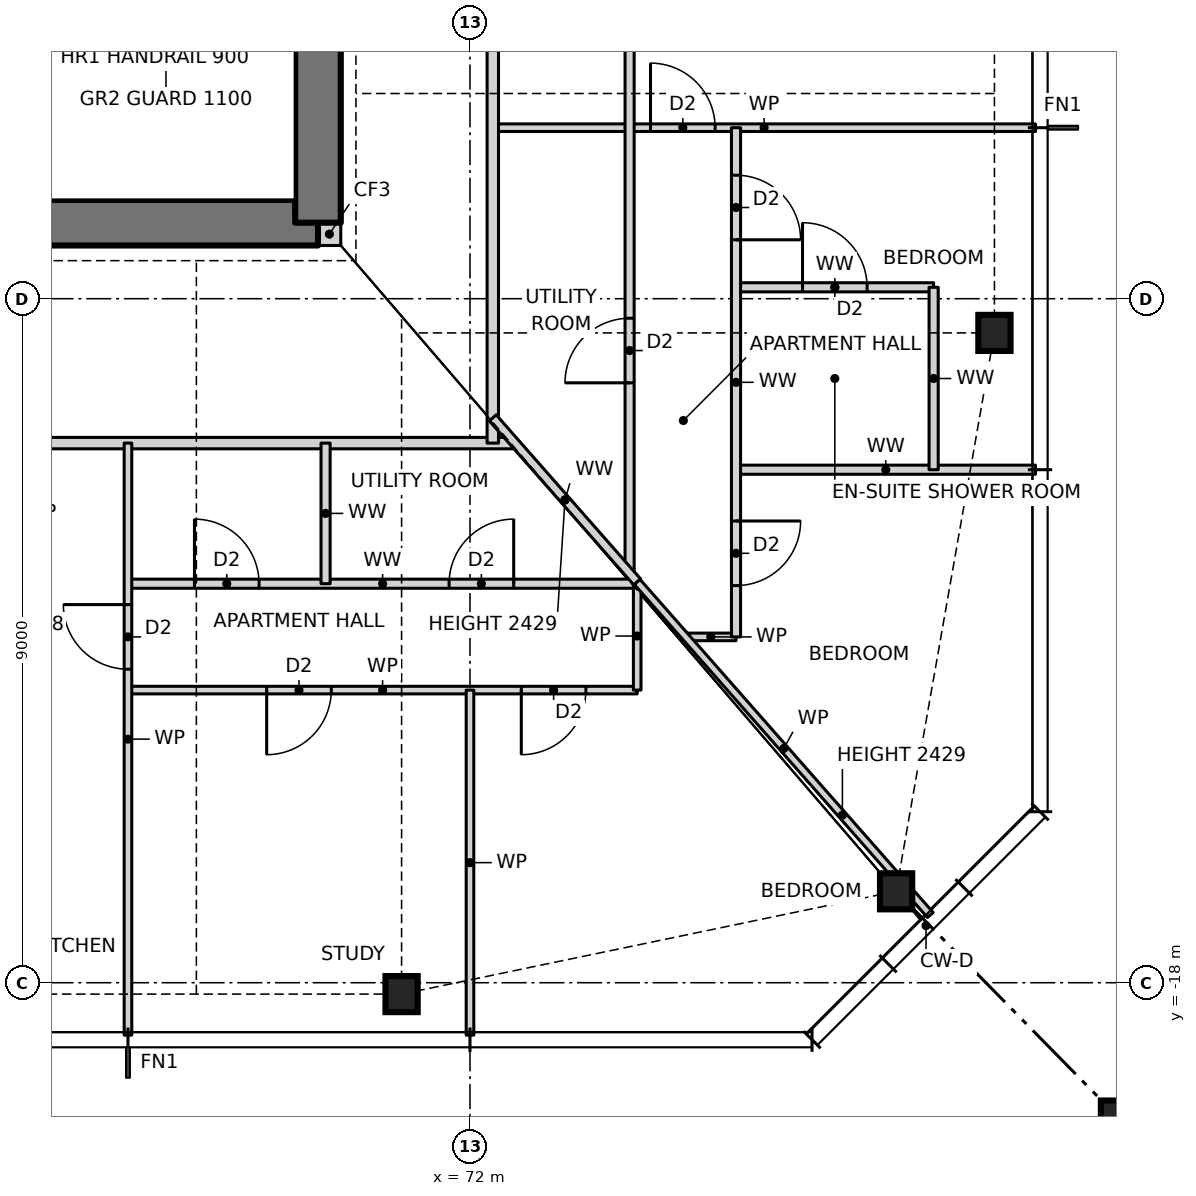
"""IFC4 building model, lengths in metres.
Left out: names, types, materials, properties, quantities, classifications, styles, units other than length and angle.
Written with IfcOpenShell. Run it as: python <this file> out.ifc"""

import sys

from ifc_helpers import new_model, si_unit, direction, frame, frame_2d, origin, origin_2d, place, context, subcontext, project, spatial, rectangle, hollow_rectangle, i_section, extrude, element, fill, save


model = new_model("IFC4")
c1 = context("Model", 3, precision=1e-05, world=origin(), true_north=direction((0.0, 1.0)))
c2 = subcontext(c1, "Body", "Model", "MODEL_VIEW")
j1 = project(units=[si_unit("LENGTHUNIT", "METRE"), si_unit("PLANEANGLEUNIT", "RADIAN")], contexts=[c1])
p1 = place(None, origin())
s1 = spatial("IfcSite", under=j1, at=p1, CompositionType="ELEMENT")
p2 = place(p1, origin())
s2 = spatial("IfcBuilding", under=s1, at=p2, CompositionType="ELEMENT")
p3 = place(p2, frame((0.0, 0.0, 64.0)))
s3 = spatial("IfcBuildingStorey", under=s2, at=p3, CompositionType="ELEMENT", Elevation=64.0)
for number, where, z_axis, x_axis in (
    (1, (71.1, -18.15, 0.0), (0.0, 0.0, 1.0), (1.0, 0.0, 0.0)),
    (2, (77.606, -16.797, 0.0), (0.0, 0.0, 1.0), (1.0, 0.0, 0.0)),
    (3, (78.9, -9.45, 0.0), (0.0, 0.0, 1.0), (1.0, 0.0, 0.0)),
):
    element("IfcColumn", number, at=place(p3, frame(where, z_axis=z_axis, x_axis=x_axis)), inside=s3, PredefinedType="COLUMN", context=c2, shape_type="SweptSolid", body=[
        extrude(i_section(OverallWidth=0.424, OverallDepth=0.475, WebThickness=0.048, FlangeThickness=0.077, at=origin_2d()), origin(), (0.0, 0.0, 1.0), 3.5),
    ])
p4 = place(p3, frame((80.9, -20.15, 0.0), z_axis=(0.0, 0.0, 1.0), x_axis=(1.0, 0.0, 0.0)))
e4 = element("IfcColumn", 4, at=p4, inside=s3, PredefinedType="COLUMN", context=c2, shape_type="SweptSolid", body=[
    extrude(hollow_rectangle(XDim=1.2, YDim=1.2, WallThickness=0.07, at=origin_2d()), origin(), (0.0, 0.0, 1.0), 3.5),
])
p5 = place(p3, frame((70.0, -8.15, 0.0), z_axis=(0.0, 0.0, 1.0), x_axis=(1.0, 0.0, 0.0)))
e5 = element("IfcWall", 5, at=p5, inside=s3, PredefinedType="SOLIDWALL", context=c2, shape_type="SweptSolid", body=[
    extrude(rectangle(XDim=0.3, YDim=0.3, at=frame_2d((0.15, 0.0))), origin(), (0.0, 0.0, 1.0), 3.5),
])
p6 = place(p3, frame((56.0, -8.0, 0.0), z_axis=(0.0, 0.0, 1.0), x_axis=(1.0, 0.0, 0.0)))
e6 = element("IfcWall", 6, at=p6, inside=s3, PredefinedType="SHEAR", context=c2, shape_type="SweptSolid", body=[
    extrude(rectangle(XDim=14.0, YDim=0.6, at=frame_2d((7.0, 0.0))), origin(), (0.0, 0.0, 1.0), 3.5),
])
p7 = place(p6, frame((2.7, 0.0, 0.0)))
e7 = element("IfcOpeningElement", 7, at=p7, cuts=e6, PredefinedType="OPENING", context=c2, shape_type="SweptSolid", body=[
    extrude(rectangle(XDim=0.9, YDim=2.1, at=frame_2d((0.45, 1.05))), frame((0.0, 0.31, 0.0), z_axis=(0.0, -1.0, 0.0), x_axis=(1.0, 0.0, 0.0)), (0.0, 0.0, 1.0), 0.62),
])
p8 = place(p6, frame((7.7, 0.0, 0.0)))
e8 = element("IfcOpeningElement", 8, at=p8, cuts=e6, PredefinedType="OPENING", context=c2, shape_type="SweptSolid", body=[
    extrude(rectangle(XDim=0.9, YDim=2.1, at=frame_2d((0.45, 1.05))), frame((0.0, 0.31, 0.0), z_axis=(0.0, -1.0, 0.0), x_axis=(1.0, 0.0, 0.0)), (0.0, 0.0, 1.0), 0.62),
])
p9 = place(p3, frame((70.0, -8.0, 0.0), z_axis=(0.0, 0.0, 1.0), x_axis=(0.0, 1.0, 0.0)))
e9 = element("IfcWall", 9, at=p9, inside=s3, PredefinedType="SHEAR", context=c2, shape_type="SweptSolid", body=[
    extrude(rectangle(XDim=16.0, YDim=0.6, at=frame_2d((8.0, 0.0))), origin(), (0.0, 0.0, 1.0), 3.5),
])
p10 = place(p9, frame((7.5, 0.0, 0.0)))
e10 = element("IfcOpeningElement", 10, at=p10, cuts=e9, PredefinedType="OPENING", context=c2, shape_type="SweptSolid", body=[
    extrude(rectangle(XDim=1.0, YDim=2.1, at=frame_2d((0.5, 1.05))), frame((0.0, 0.31, 0.0), z_axis=(0.0, -1.0, 0.0), x_axis=(1.0, 0.0, 0.0)), (0.0, 0.0, 1.0), 0.62),
])
p11 = place(p3, frame((67.5, -14.15, 0.0), z_axis=(0.0, 0.0, 1.0), x_axis=(1.0, 0.0, 0.0)))
e11 = element("IfcWall", 11, at=p11, inside=s3, PredefinedType="PARTITIONING", context=c2, shape_type="SweptSolid", body=[
    extrude(rectangle(XDim=6.7, YDim=0.1, at=frame_2d((3.35, 0.0))), origin(), (0.0, 0.0, 1.0), 3.27),
])
p12 = place(p11, frame((1.825, 0.0, 0.0)))
e12 = element("IfcOpeningElement", 12, at=p12, cuts=e11, PredefinedType="OPENING", context=c2, shape_type="SweptSolid", body=[
    extrude(rectangle(XDim=0.85, YDim=2.1, at=frame_2d((0.425, 1.05))), frame((0.0, 0.06, 0.0), z_axis=(0.0, -1.0, 0.0), x_axis=(1.0, 0.0, 0.0)), (0.0, 0.0, 1.0), 0.12),
])
p13 = place(p11, frame((5.175, 0.0, 0.0)))
e13 = element("IfcOpeningElement", 13, at=p13, cuts=e11, PredefinedType="OPENING", context=c2, shape_type="SweptSolid", body=[
    extrude(rectangle(XDim=0.85, YDim=2.1, at=frame_2d((0.425, 1.05))), frame((0.0, 0.06, 0.0), z_axis=(0.0, -1.0, 0.0), x_axis=(1.0, 0.0, 0.0)), (0.0, 0.0, 1.0), 0.12),
])
p14 = place(p3, frame((74.836, -13.45, 0.0), z_axis=(0.0, 0.0, 1.0), x_axis=(1.0, 0.0, 0.0)))
e14 = element("IfcWall", 14, at=p14, inside=s3, PredefinedType="PARTITIONING", context=c2, shape_type="SweptSolid", body=[
    extrude(rectangle(XDim=0.664, YDim=0.1, at=frame_2d((0.332, 0.0))), origin(), (0.0, 0.0, 1.0), 3.27),
])
p15 = place(p3, frame((67.5, -12.75, 0.0), z_axis=(0.0, 0.0, 1.0), x_axis=(1.0, 0.0, 0.0)))
e15 = element("IfcWall", 15, at=p15, inside=s3, PredefinedType="PARTITIONING", context=c2, shape_type="SweptSolid", body=[
    extrude(rectangle(XDim=6.7, YDim=0.12, at=frame_2d((3.35, 0.0))), origin(), (0.0, 0.0, 1.0), 3.27),
])
p16 = place(p15, frame((0.875, 0.0, 0.0)))
e16 = element("IfcOpeningElement", 16, at=p16, cuts=e15, PredefinedType="OPENING", context=c2, shape_type="SweptSolid", body=[
    extrude(rectangle(XDim=0.85, YDim=2.1, at=frame_2d((0.425, 1.05))), frame((0.0, 0.07, 0.0), z_axis=(0.0, -1.0, 0.0), x_axis=(1.0, 0.0, 0.0)), (0.0, 0.0, 1.0), 0.14),
])
p17 = place(p15, frame((4.225, 0.0, 0.0)))
e17 = element("IfcOpeningElement", 17, at=p17, cuts=e15, PredefinedType="OPENING", context=c2, shape_type="SweptSolid", body=[
    extrude(rectangle(XDim=0.85, YDim=2.1, at=frame_2d((0.425, 1.05))), frame((0.0, 0.07, 0.0), z_axis=(0.0, -1.0, 0.0), x_axis=(1.0, 0.0, 0.0)), (0.0, 0.0, 1.0), 0.14),
])
p18 = place(p3, frame((75.5, -11.25, 0.0), z_axis=(0.0, 0.0, 1.0), x_axis=(1.0, 0.0, 0.0)))
e18 = element("IfcWall", 18, at=p18, inside=s3, PredefinedType="PARTITIONING", context=c2, shape_type="SweptSolid", body=[
    extrude(rectangle(XDim=3.94, YDim=0.12, at=frame_2d((1.97, 0.0))), origin(), (0.0, 0.0, 1.0), 3.27),
])
p19 = place(p3, frame((53.408, -10.9, 0.0), z_axis=(0.0, 0.0, 1.0), x_axis=(1.0, 0.0, 0.0)))
e19 = element("IfcWall", 19, at=p19, inside=s3, PredefinedType="PARTITIONING", context=c2, shape_type="SweptSolid", body=[
    extrude(rectangle(XDim=19.184, YDim=0.15, at=frame_2d((9.592, 0.0))), origin(), (0.0, 0.0, 1.0), 3.27),
])
p20 = place(p19, frame((5.092, 0.0, 0.0)))
e20 = element("IfcOpeningElement", 20, at=p20, cuts=e19, PredefinedType="OPENING", context=c2, shape_type="SweptSolid", body=[
    extrude(rectangle(XDim=1.0, YDim=2.1, at=frame_2d((0.5, 1.05))), frame((0.0, 0.085, 0.0), z_axis=(0.0, -1.0, 0.0), x_axis=(1.0, 0.0, 0.0)), (0.0, 0.0, 1.0), 0.17),
])
p21 = place(p19, frame((10.492, 0.0, 0.0)))
e21 = element("IfcOpeningElement", 21, at=p21, cuts=e19, PredefinedType="OPENING", context=c2, shape_type="SweptSolid", body=[
    extrude(rectangle(XDim=1.0, YDim=2.1, at=frame_2d((0.5, 1.05))), frame((0.0, 0.085, 0.0), z_axis=(0.0, -1.0, 0.0), x_axis=(1.0, 0.0, 0.0)), (0.0, 0.0, 1.0), 0.17),
])
p22 = place(p3, frame((75.5, -8.85, 0.0), z_axis=(0.0, 0.0, 1.0), x_axis=(1.0, 0.0, 0.0)))
e22 = element("IfcWall", 22, at=p22, inside=s3, PredefinedType="PARTITIONING", context=c2, shape_type="SweptSolid", body=[
    extrude(rectangle(XDim=2.6, YDim=0.12, at=frame_2d((1.3, 0.0))), origin(), (0.0, 0.0, 1.0), 3.27),
])
p23 = place(p22, frame((0.875, 0.0, 0.0)))
e23 = element("IfcOpeningElement", 23, at=p23, cuts=e22, PredefinedType="OPENING", context=c2, shape_type="SweptSolid", body=[
    extrude(rectangle(XDim=0.85, YDim=2.1, at=frame_2d((0.425, 1.05))), frame((0.0, 0.07, 0.0), z_axis=(0.0, -1.0, 0.0), x_axis=(1.0, 0.0, 0.0)), (0.0, 0.0, 1.0), 0.14),
])
p24 = place(p3, frame((72.3, -6.75, 0.0), z_axis=(0.0, 0.0, 1.0), x_axis=(1.0, 0.0, 0.0)))
e24 = element("IfcWall", 24, at=p24, inside=s3, PredefinedType="PARTITIONING", context=c2, shape_type="SweptSolid", body=[
    extrude(rectangle(XDim=7.14, YDim=0.1, at=frame_2d((3.57, 0.0))), origin(), (0.0, 0.0, 1.0), 3.27),
])
p25 = place(p24, frame((2.075, 0.0, 0.0)))
e25 = element("IfcOpeningElement", 25, at=p25, cuts=e24, PredefinedType="OPENING", context=c2, shape_type="SweptSolid", body=[
    extrude(rectangle(XDim=0.85, YDim=2.1, at=frame_2d((0.425, 1.05))), frame((0.0, 0.06, 0.0), z_axis=(0.0, -1.0, 0.0), x_axis=(1.0, 0.0, 0.0)), (0.0, 0.0, 1.0), 0.12),
])
p26 = place(p3, frame((78.1, -11.25, 0.0), z_axis=(0.0, 0.0, 1.0), x_axis=(0.0, 1.0, 0.0)))
e26 = element("IfcWall", 26, at=p26, inside=s3, PredefinedType="PARTITIONING", context=c2, shape_type="SweptSolid", body=[
    extrude(rectangle(XDim=2.4, YDim=0.12, at=frame_2d((1.2, 0.0))), origin(), (0.0, 0.0, 1.0), 3.27),
])
p27 = place(p3, frame((75.5, -13.45, 0.0), z_axis=(0.0, 0.0, 1.0), x_axis=(0.0, 1.0, 0.0)))
e27 = element("IfcWall", 27, at=p27, inside=s3, PredefinedType="PARTITIONING", context=c2, shape_type="SweptSolid", body=[
    extrude(rectangle(XDim=6.7, YDim=0.12, at=frame_2d((3.35, 0.0))), origin(), (0.0, 0.0, 1.0), 3.27),
])
p28 = place(p27, frame((5.225, 0.0, 0.0)))
e28 = element("IfcOpeningElement", 28, at=p28, cuts=e27, PredefinedType="OPENING", context=c2, shape_type="SweptSolid", body=[
    extrude(rectangle(XDim=0.85, YDim=2.1, at=frame_2d((0.425, 1.05))), frame((0.0, 0.07, 0.0), z_axis=(0.0, -1.0, 0.0), x_axis=(1.0, 0.0, 0.0)), (0.0, 0.0, 1.0), 0.14),
])
p29 = place(p27, frame((0.675, 0.0, 0.0)))
e29 = element("IfcOpeningElement", 29, at=p29, cuts=e27, PredefinedType="OPENING", context=c2, shape_type="SweptSolid", body=[
    extrude(rectangle(XDim=0.85, YDim=2.1, at=frame_2d((0.425, 1.05))), frame((0.0, 0.07, 0.0), z_axis=(0.0, -1.0, 0.0), x_axis=(1.0, 0.0, 0.0)), (0.0, 0.0, 1.0), 0.14),
])
p30 = place(p3, frame((74.2, -14.15, 0.0), z_axis=(0.0, 0.0, 1.0), x_axis=(0.0, 1.0, 0.0)))
e30 = element("IfcWall", 30, at=p30, inside=s3, PredefinedType="PARTITIONING", context=c2, shape_type="SweptSolid", body=[
    extrude(rectangle(XDim=1.423, YDim=0.1, at=frame_2d((0.711, 0.0))), origin(), (0.0, 0.0, 1.0), 3.27),
])
p31 = place(p3, frame((74.1, -12.614, 0.0), z_axis=(0.0, 0.0, 1.0), x_axis=(0.0, 1.0, 0.0)))
e31 = element("IfcWall", 31, at=p31, inside=s3, PredefinedType="PARTITIONING", context=c2, shape_type="SweptSolid", body=[
    extrude(rectangle(XDim=25.228, YDim=0.12, at=frame_2d((12.614, 0.0))), origin(), (0.0, 0.0, 1.0), 3.27),
])
p32 = place(p31, frame((7.239, 0.0, 0.0)))
e32 = element("IfcOpeningElement", 32, at=p32, cuts=e31, PredefinedType="OPENING", context=c2, shape_type="SweptSolid", body=[
    extrude(rectangle(XDim=0.85, YDim=2.1, at=frame_2d((0.425, 1.05))), frame((0.0, 0.07, 0.0), z_axis=(0.0, -1.0, 0.0), x_axis=(1.0, 0.0, 0.0)), (0.0, 0.0, 1.0), 0.14),
])
p33 = place(p31, frame((10.439, 0.0, 0.0)))
e33 = element("IfcOpeningElement", 33, at=p33, cuts=e31, PredefinedType="OPENING", context=c2, shape_type="SweptSolid", body=[
    extrude(rectangle(XDim=0.85, YDim=2.1, at=frame_2d((0.425, 1.05))), frame((0.0, 0.07, 0.0), z_axis=(0.0, -1.0, 0.0), x_axis=(1.0, 0.0, 0.0)), (0.0, 0.0, 1.0), 0.14),
])
p34 = place(p31, frame((2.507, 0.0, 0.0)))
e34 = element("IfcOpeningElement", 34, at=p34, cuts=e31, PredefinedType="OPENING", context=c2, shape_type="SweptSolid", body=[
    extrude(rectangle(XDim=0.85, YDim=2.1, at=frame_2d((0.425, 1.05))), frame((0.0, 0.07, 0.0), z_axis=(0.0, -1.0, 0.0), x_axis=(1.0, 0.0, 0.0)), (0.0, 0.0, 1.0), 0.14),
])
p35 = place(p31, frame((16.639, 0.0, 0.0)))
e35 = element("IfcOpeningElement", 35, at=p35, cuts=e31, PredefinedType="OPENING", context=c2, shape_type="SweptSolid", body=[
    extrude(rectangle(XDim=0.85, YDim=2.1, at=frame_2d((0.425, 1.05))), frame((0.0, 0.07, 0.0), z_axis=(0.0, -1.0, 0.0), x_axis=(1.0, 0.0, 0.0)), (0.0, 0.0, 1.0), 0.14),
])
p36 = place(p31, frame((21.821, 0.0, 0.0)))
e36 = element("IfcOpeningElement", 36, at=p36, cuts=e31, PredefinedType="OPENING", context=c2, shape_type="SweptSolid", body=[
    extrude(rectangle(XDim=0.85, YDim=2.1, at=frame_2d((0.425, 1.05))), frame((0.0, 0.07, 0.0), z_axis=(0.0, -1.0, 0.0), x_axis=(1.0, 0.0, 0.0)), (0.0, 0.0, 1.0), 0.14),
])
p37 = place(p3, frame((72.3, -10.9, 0.0), z_axis=(0.0, 0.0, 1.0), x_axis=(0.0, 1.0, 0.0)))
e37 = element("IfcWall", 37, at=p37, inside=s3, PredefinedType="PARTITIONING", context=c2, shape_type="SweptSolid", body=[
    extrude(rectangle(XDim=21.468, YDim=0.15, at=frame_2d((10.734, 0.0))), origin(), (0.0, 0.0, 1.0), 3.27),
])
p38 = place(p37, frame((8.65, 0.0, 0.0)))
e38 = element("IfcOpeningElement", 38, at=p38, cuts=e37, PredefinedType="OPENING", context=c2, shape_type="SweptSolid", body=[
    extrude(rectangle(XDim=1.0, YDim=2.1, at=frame_2d((0.5, 1.05))), frame((0.0, 0.085, 0.0), z_axis=(0.0, -1.0, 0.0), x_axis=(1.0, 0.0, 0.0)), (0.0, 0.0, 1.0), 0.17),
])
p39 = place(p3, frame((72.0, -18.69, 0.0), z_axis=(0.0, 0.0, 1.0), x_axis=(0.0, 1.0, 0.0)))
e39 = element("IfcWall", 39, at=p39, inside=s3, PredefinedType="PARTITIONING", context=c2, shape_type="SweptSolid", body=[
    extrude(rectangle(XDim=4.54, YDim=0.1, at=frame_2d((2.27, 0.0))), origin(), (0.0, 0.0, 1.0), 3.27),
])
p40 = place(p3, frame((70.1, -12.75, 0.0), z_axis=(0.0, 0.0, 1.0), x_axis=(0.0, 1.0, 0.0)))
e40 = element("IfcWall", 40, at=p40, inside=s3, PredefinedType="PARTITIONING", context=c2, shape_type="SweptSolid", body=[
    extrude(rectangle(XDim=1.85, YDim=0.12, at=frame_2d((0.925, 0.0))), origin(), (0.0, 0.0, 1.0), 3.27),
])
p41 = place(p3, frame((67.5, -18.69, 0.0), z_axis=(0.0, 0.0, 1.0), x_axis=(0.0, 1.0, 0.0)))
e41 = element("IfcWall", 41, at=p41, inside=s3, PredefinedType="PARTITIONING", context=c2, shape_type="SweptSolid", body=[
    extrude(rectangle(XDim=7.79, YDim=0.1, at=frame_2d((3.895, 0.0))), origin(), (0.0, 0.0, 1.0), 3.27),
])
p42 = place(p41, frame((4.815, 0.0, 0.0)))
e42 = element("IfcOpeningElement", 42, at=p42, cuts=e41, PredefinedType="OPENING", context=c2, shape_type="SweptSolid", body=[
    extrude(rectangle(XDim=0.85, YDim=2.1, at=frame_2d((0.425, 1.05))), frame((0.0, 0.06, 0.0), z_axis=(0.0, -1.0, 0.0), x_axis=(1.0, 0.0, 0.0)), (0.0, 0.0, 1.0), 0.12),
])
p43 = place(p3, frame((74.2, -12.727, 0.0), z_axis=(0.0, 0.0, 1.0), x_axis=(-0.66059344937, 0.75074382758, 0.0)))
e43 = element("IfcWall", 43, at=p43, inside=s3, PredefinedType="PARTITIONING", context=c2, shape_type="SweptSolid", body=[
    extrude(rectangle(XDim=2.876, YDim=0.12, at=frame_2d((1.438, 0.0))), origin(), (0.0, 0.0, 1.0), 2.429),
])
p44 = place(p3, frame((78.057, -17.109, 0.0), z_axis=(0.0, 0.0, 1.0), x_axis=(-0.660654290516, 0.750690287951, 0.0)))
e44 = element("IfcWall", 44, at=p44, inside=s3, PredefinedType="PARTITIONING", context=c2, shape_type="SweptSolid", body=[
    extrude(rectangle(XDim=5.838, YDim=0.1, at=frame_2d((2.919, 0.0))), origin(), (0.0, 0.0, 1.0), 2.429),
])
p45 = place(p42, origin())
e45 = element("IfcDoor", 45, at=p45, inside=s3, OperationType="SINGLE_SWING_RIGHT", PredefinedType="DOOR", context=c2, shape_type="SweptSolid", body=[
    extrude(rectangle(XDim=0.85, YDim=2.1, at=frame_2d((0.425, 1.05))), frame((0.0, 0.025, 0.0), z_axis=(0.0, -1.0, 0.0), x_axis=(1.0, 0.0, 0.0)), (0.0, 0.0, 1.0), 0.05),
])
fill(e42, e45)
p46 = place(p12, frame((0.85, 0.0, 0.0), z_axis=(0.0, 0.0, 1.0), x_axis=(-1.0, 0.0, 0.0)))
e46 = element("IfcDoor", 46, at=p46, inside=s3, OperationType="SINGLE_SWING_RIGHT", PredefinedType="DOOR", context=c2, shape_type="SweptSolid", body=[
    extrude(rectangle(XDim=0.85, YDim=2.1, at=frame_2d((0.425, 1.05))), frame((0.0, 0.025, 0.0), z_axis=(0.0, -1.0, 0.0), x_axis=(1.0, 0.0, 0.0)), (0.0, 0.0, 1.0), 0.05),
])
fill(e12, e46)
p47 = place(p13, frame((0.85, 0.0, 0.0), z_axis=(0.0, 0.0, 1.0), x_axis=(-1.0, 0.0, 0.0)))
e47 = element("IfcDoor", 47, at=p47, inside=s3, OperationType="SINGLE_SWING_RIGHT", PredefinedType="DOOR", context=c2, shape_type="SweptSolid", body=[
    extrude(rectangle(XDim=0.85, YDim=2.1, at=frame_2d((0.425, 1.05))), frame((0.0, 0.025, 0.0), z_axis=(0.0, -1.0, 0.0), x_axis=(1.0, 0.0, 0.0)), (0.0, 0.0, 1.0), 0.05),
])
fill(e13, e47)
p48 = place(p16, origin())
e48 = element("IfcDoor", 48, at=p48, inside=s3, OperationType="SINGLE_SWING_LEFT", PredefinedType="DOOR", context=c2, shape_type="SweptSolid", body=[
    extrude(rectangle(XDim=0.85, YDim=2.1, at=frame_2d((0.425, 1.05))), frame((0.0, 0.025, 0.0), z_axis=(0.0, -1.0, 0.0), x_axis=(1.0, 0.0, 0.0)), (0.0, 0.0, 1.0), 0.05),
])
fill(e16, e48)
p49 = place(p17, origin())
e49 = element("IfcDoor", 49, at=p49, inside=s3, OperationType="SINGLE_SWING_RIGHT", PredefinedType="DOOR", context=c2, shape_type="SweptSolid", body=[
    extrude(rectangle(XDim=0.85, YDim=2.1, at=frame_2d((0.425, 1.05))), frame((0.0, 0.025, 0.0), z_axis=(0.0, -1.0, 0.0), x_axis=(1.0, 0.0, 0.0)), (0.0, 0.0, 1.0), 0.05),
])
fill(e17, e49)
p50 = place(p25, origin())
e50 = element("IfcDoor", 50, at=p50, inside=s3, OperationType="SINGLE_SWING_LEFT", PredefinedType="DOOR", context=c2, shape_type="SweptSolid", body=[
    extrude(rectangle(XDim=0.85, YDim=2.1, at=frame_2d((0.425, 1.05))), frame((0.0, 0.025, 0.0), z_axis=(0.0, -1.0, 0.0), x_axis=(1.0, 0.0, 0.0)), (0.0, 0.0, 1.0), 0.05),
])
fill(e25, e50)
p51 = place(p23, origin())
e51 = element("IfcDoor", 51, at=p51, inside=s3, OperationType="SINGLE_SWING_LEFT", PredefinedType="DOOR", context=c2, shape_type="SweptSolid", body=[
    extrude(rectangle(XDim=0.85, YDim=2.1, at=frame_2d((0.425, 1.05))), frame((0.0, 0.025, 0.0), z_axis=(0.0, -1.0, 0.0), x_axis=(1.0, 0.0, 0.0)), (0.0, 0.0, 1.0), 0.05),
])
fill(e23, e51)
p52 = place(p28, frame((0.85, 0.0, 0.0), z_axis=(0.0, 0.0, 1.0), x_axis=(-1.0, 0.0, 0.0)))
e52 = element("IfcDoor", 52, at=p52, inside=s3, OperationType="SINGLE_SWING_RIGHT", PredefinedType="DOOR", context=c2, shape_type="SweptSolid", body=[
    extrude(rectangle(XDim=0.85, YDim=2.1, at=frame_2d((0.425, 1.05))), frame((0.0, 0.025, 0.0), z_axis=(0.0, -1.0, 0.0), x_axis=(1.0, 0.0, 0.0)), (0.0, 0.0, 1.0), 0.05),
])
fill(e28, e52)
p53 = place(p29, frame((0.85, 0.0, 0.0), z_axis=(0.0, 0.0, 1.0), x_axis=(-1.0, 0.0, 0.0)))
e53 = element("IfcDoor", 53, at=p53, inside=s3, OperationType="SINGLE_SWING_LEFT", PredefinedType="DOOR", context=c2, shape_type="SweptSolid", body=[
    extrude(rectangle(XDim=0.85, YDim=2.1, at=frame_2d((0.425, 1.05))), frame((0.0, 0.025, 0.0), z_axis=(0.0, -1.0, 0.0), x_axis=(1.0, 0.0, 0.0)), (0.0, 0.0, 1.0), 0.05),
])
fill(e29, e53)
p54 = place(p34, origin())
e54 = element("IfcDoor", 54, at=p54, inside=s3, OperationType="SINGLE_SWING_LEFT", PredefinedType="DOOR", context=c2, shape_type="SweptSolid", body=[
    extrude(rectangle(XDim=0.85, YDim=2.1, at=frame_2d((0.425, 1.05))), frame((0.0, 0.025, 0.0), z_axis=(0.0, -1.0, 0.0), x_axis=(1.0, 0.0, 0.0)), (0.0, 0.0, 1.0), 0.05),
])
fill(e34, e54)
save(model, sys.argv[1])
